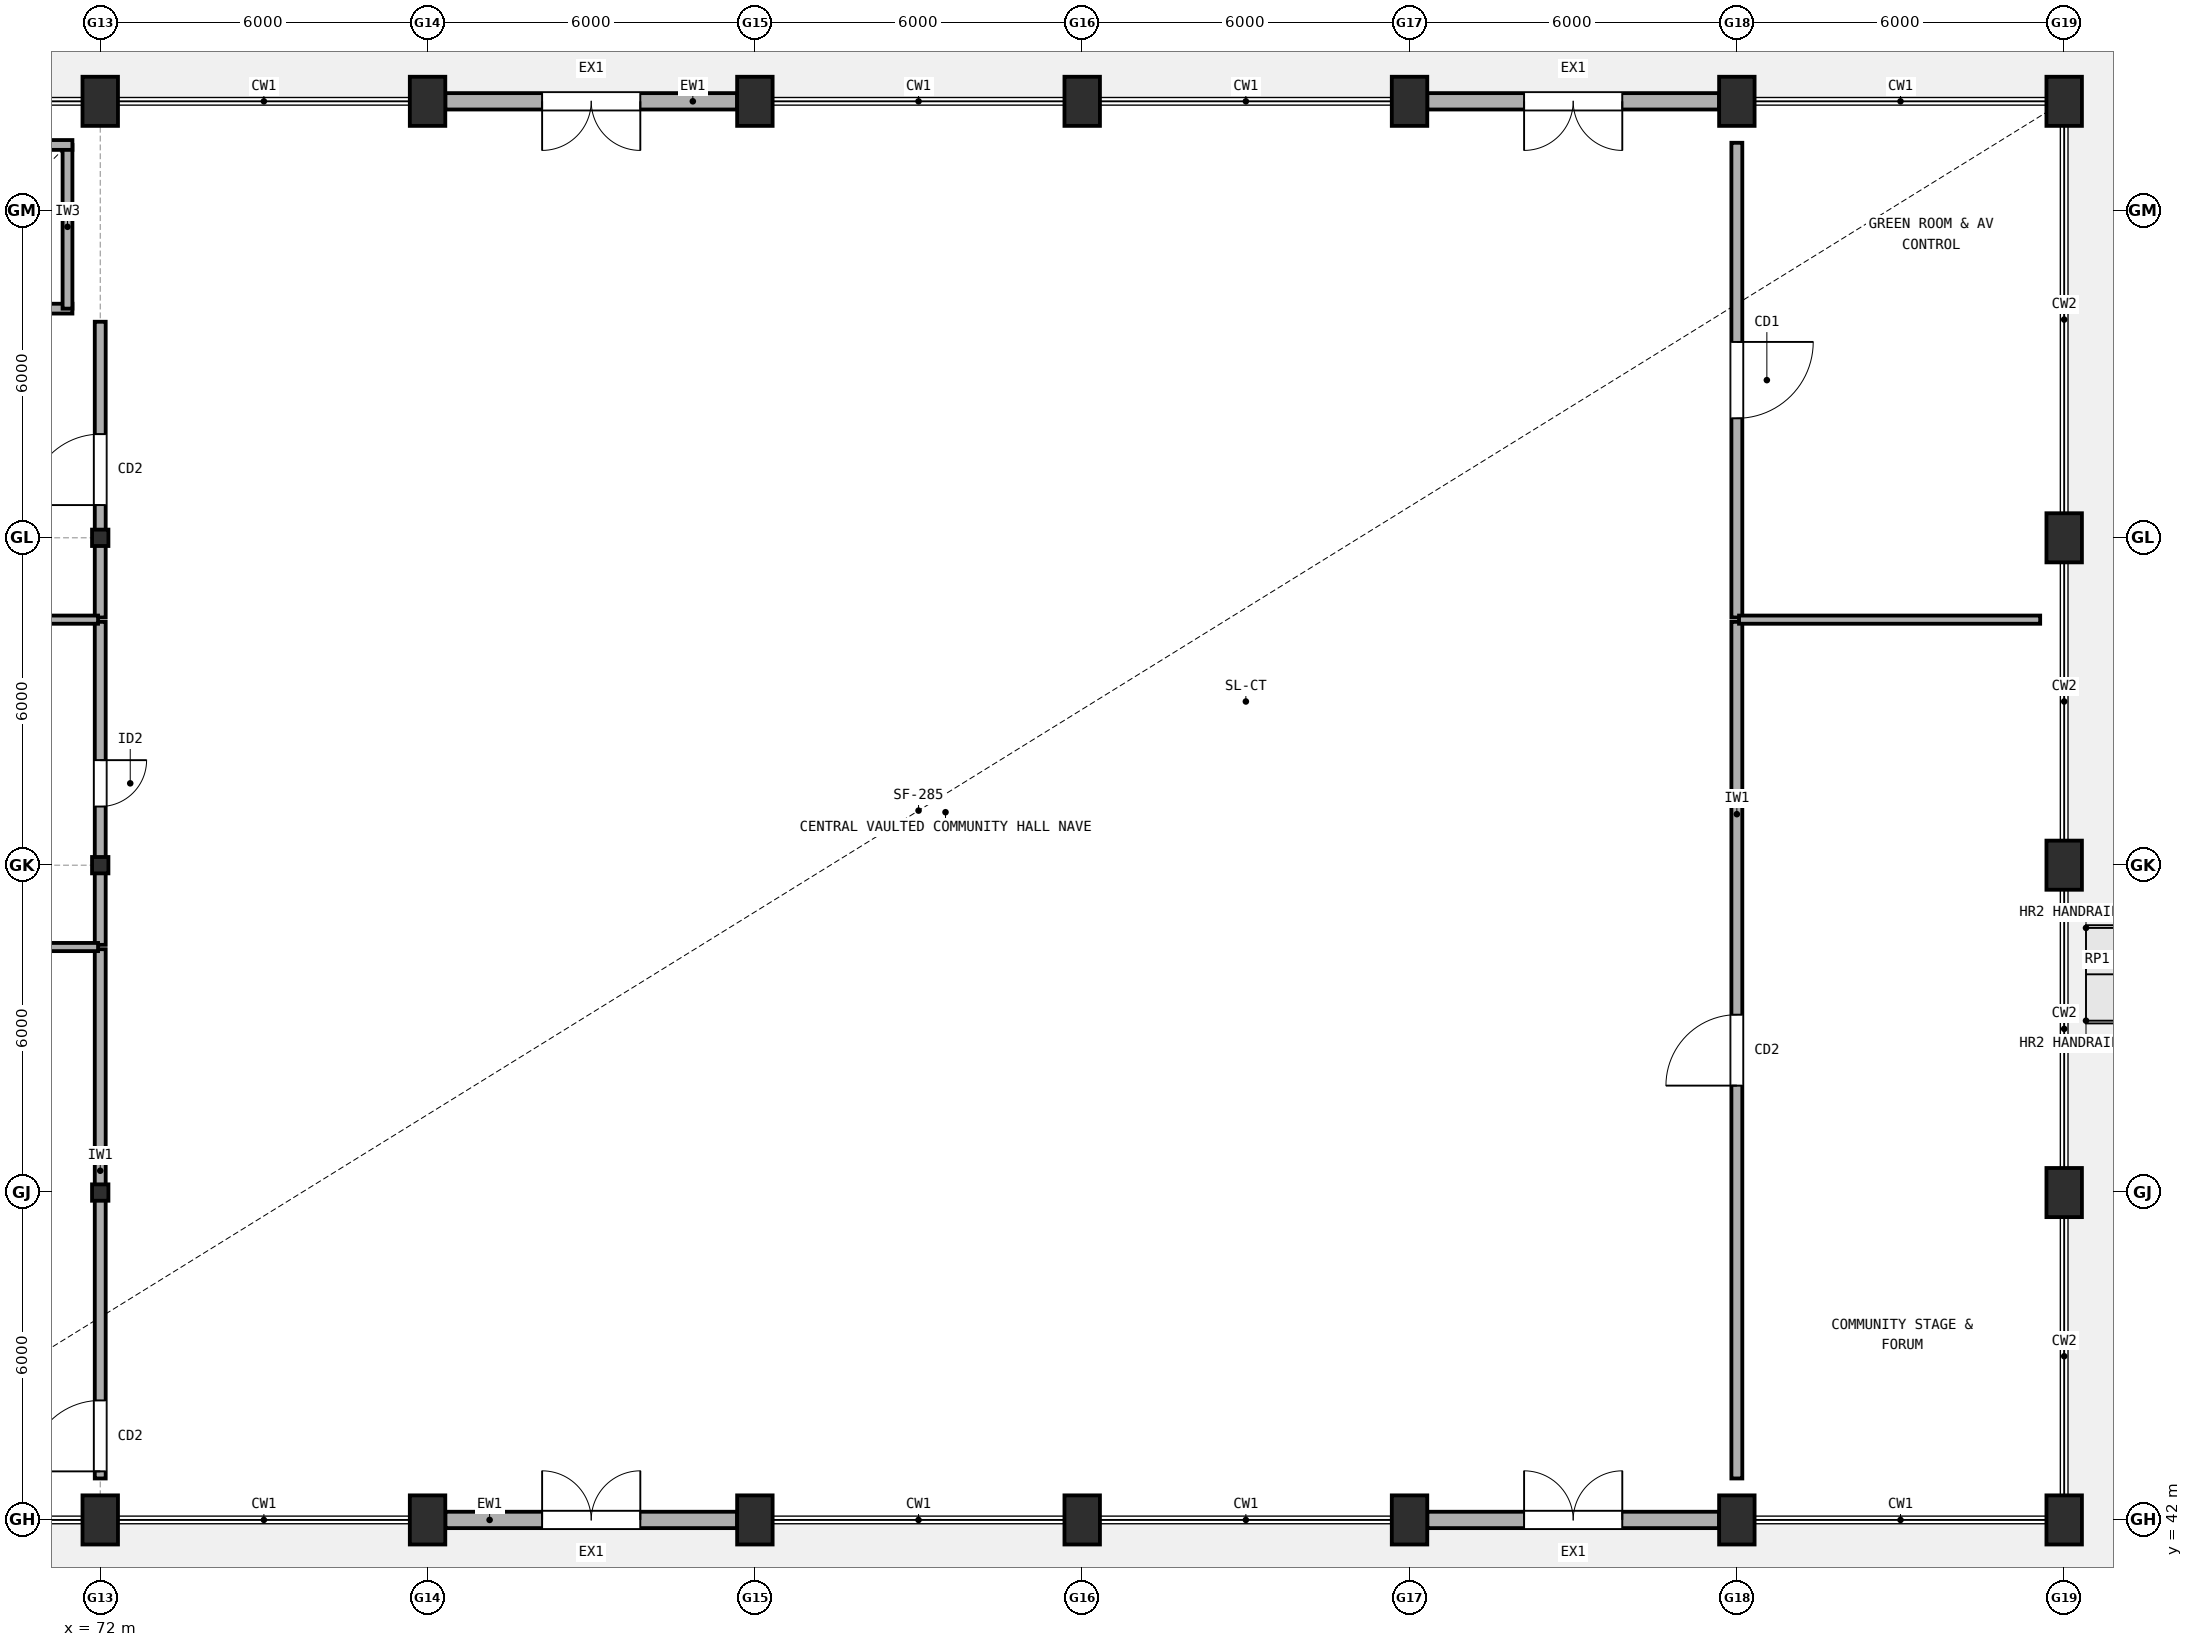
"""IFC4 building model, lengths in metres.
Left out: names, types, materials, properties, quantities, classifications, styles, units other than length and angle.
Written with IfcOpenShell. Run it as: python <this file> out.ifc"""

import sys

from ifc_helpers import new_model, si_unit, direction, frame, frame_2d, origin, origin_2d, place, context, subcontext, project, spatial, rectangle, i_section, extrude, element, fill, save


model = new_model("IFC4")
c1 = context("Model", 3, precision=1e-05, world=origin(), true_north=direction((0.0, 1.0)))
c2 = subcontext(c1, "Body", "Model", "MODEL_VIEW")
j1 = project(units=[si_unit("LENGTHUNIT", "METRE"), si_unit("PLANEANGLEUNIT", "RADIAN")], contexts=[c1])
p1 = place(None, origin())
s1 = spatial("IfcSite", under=j1, at=p1, CompositionType="ELEMENT")
p2 = place(p1, origin())
s2 = spatial("IfcBuilding", under=s1, at=p2, CompositionType="ELEMENT")
p3 = place(p2, origin())
s3 = spatial("IfcBuildingStorey", under=s2, at=p3, CompositionType="ELEMENT", Elevation=0.0)
p4 = place(p3, frame((72.0, 42.0, 0.0), z_axis=(0.0, 0.0, 1.0), x_axis=(1.0, 0.0, 0.0)))
e1 = element("IfcColumn", 1, at=p4, inside=s3, PredefinedType="COLUMN", context=c2, shape_type="SweptSolid", body=[
    extrude(rectangle(XDim=0.65, YDim=0.9, at=origin_2d()), origin(), (0.0, 0.0, 1.0), 4.23),
])
for number, where, z_axis, x_axis in (
    (2, (72.0, 48.0, 0.0), (0.0, 0.0, 1.0), (1.0, 0.0, 0.0)),
    (3, (72.0, 54.0, 0.0), (0.0, 0.0, 1.0), (1.0, 0.0, 0.0)),
    (4, (72.0, 60.0, 0.0), (0.0, 0.0, 1.0), (1.0, 0.0, 0.0)),
):
    element("IfcColumn", number, at=place(p3, frame(where, z_axis=z_axis, x_axis=x_axis)), inside=s3, PredefinedType="COLUMN", context=c2, shape_type="SweptSolid", body=[
        extrude(i_section(OverallWidth=0.3, OverallDepth=0.3, WebThickness=0.011, FlangeThickness=0.019, FilletRadius=0.027, at=origin_2d()), origin(), (0.0, 0.0, 1.0), 4.23),
    ])
p5 = place(p3, frame((72.0, 68.0, 0.0), z_axis=(0.0, 0.0, 1.0), x_axis=(1.0, 0.0, 0.0)))
e5 = element("IfcColumn", 5, at=p5, inside=s3, PredefinedType="COLUMN", context=c2, shape_type="SweptSolid", body=[
    extrude(rectangle(XDim=0.65, YDim=0.9, at=origin_2d()), origin(), (0.0, 0.0, 1.0), 4.23),
])
for number, where, z_axis, x_axis in (
    (6, (78.0, 42.0, 0.0), (0.0, 0.0, 1.0), (1.0, 0.0, 0.0)),
    (7, (78.0, 68.0, 0.0), (0.0, 0.0, 1.0), (1.0, 0.0, 0.0)),
    (8, (84.0, 42.0, 0.0), (0.0, 0.0, 1.0), (1.0, 0.0, 0.0)),
    (9, (84.0, 68.0, 0.0), (0.0, 0.0, 1.0), (1.0, 0.0, 0.0)),
    (10, (90.0, 42.0, 0.0), (0.0, 0.0, 1.0), (1.0, 0.0, 0.0)),
    (11, (90.0, 68.0, 0.0), (0.0, 0.0, 1.0), (1.0, 0.0, 0.0)),
    (12, (96.0, 42.0, 0.0), (0.0, 0.0, 1.0), (1.0, 0.0, 0.0)),
    (13, (96.0, 68.0, 0.0), (0.0, 0.0, 1.0), (1.0, 0.0, 0.0)),
    (14, (102.0, 42.0, 0.0), (0.0, 0.0, 1.0), (1.0, 0.0, 0.0)),
    (15, (102.0, 68.0, 0.0), (0.0, 0.0, 1.0), (1.0, 0.0, 0.0)),
    (16, (108.0, 42.0, 0.0), (0.0, 0.0, 1.0), (1.0, 0.0, 0.0)),
    (17, (108.0, 48.0, 0.0), (0.0, 0.0, 1.0), (1.0, 0.0, 0.0)),
    (18, (108.0, 54.0, 0.0), (0.0, 0.0, 1.0), (1.0, 0.0, 0.0)),
    (19, (108.0, 60.0, 0.0), (0.0, 0.0, 1.0), (1.0, 0.0, 0.0)),
    (20, (108.0, 68.0, 0.0), (0.0, 0.0, 1.0), (1.0, 0.0, 0.0)),
):
    element("IfcColumn", number, at=place(p3, frame(where, z_axis=z_axis, x_axis=x_axis)), inside=s3, PredefinedType="COLUMN", context=c2, shape_type="SweptSolid", body=[
        extrude(rectangle(XDim=0.65, YDim=0.9, at=origin_2d()), origin(), (0.0, 0.0, 1.0), 4.5),
    ])
p6 = place(p3, frame((78.325, 42.0, 0.0), z_axis=(0.0, 0.0, 1.0), x_axis=(1.0, 0.0, 0.0)))
e21 = element("IfcWall", 21, at=p6, inside=s3, PredefinedType="STANDARD", context=c2, shape_type="SweptSolid", body=[
    extrude(rectangle(XDim=5.35, YDim=0.3, at=frame_2d((2.675, 0.0))), origin(), (0.0, 0.0, 1.0), 3.112),
])
p7 = place(p6, frame((1.775, 0.0, 0.0)))
e22 = element("IfcOpeningElement", 22, at=p7, cuts=e21, PredefinedType="OPENING", context=c2, shape_type="SweptSolid", body=[
    extrude(rectangle(XDim=1.8, YDim=2.2, at=frame_2d((0.9, 1.1))), frame((0.0, 0.16, 0.0), z_axis=(0.0, -1.0, 0.0), x_axis=(1.0, 0.0, 0.0)), (0.0, 0.0, 1.0), 0.32),
])
p8 = place(p3, frame((83.675, 68.0, 0.0), z_axis=(0.0, 0.0, 1.0), x_axis=(-1.0, 0.0, 0.0)))
e23 = element("IfcWall", 23, at=p8, inside=s3, PredefinedType="STANDARD", context=c2, shape_type="SweptSolid", body=[
    extrude(rectangle(XDim=5.35, YDim=0.3, at=frame_2d((2.675, 0.0))), origin(), (0.0, 0.0, 1.0), 3.562),
])
p9 = place(p8, frame((1.775, 0.0, 0.0)))
e24 = element("IfcOpeningElement", 24, at=p9, cuts=e23, PredefinedType="OPENING", context=c2, shape_type="SweptSolid", body=[
    extrude(rectangle(XDim=1.8, YDim=2.2, at=frame_2d((0.9, 1.1))), frame((0.0, 0.16, 0.0), z_axis=(0.0, -1.0, 0.0), x_axis=(1.0, 0.0, 0.0)), (0.0, 0.0, 1.0), 0.32),
])
p10 = place(p3, frame((96.325, 42.0, 0.0), z_axis=(0.0, 0.0, 1.0), x_axis=(1.0, 0.0, 0.0)))
e25 = element("IfcWall", 25, at=p10, inside=s3, PredefinedType="STANDARD", context=c2, shape_type="SweptSolid", body=[
    extrude(rectangle(XDim=5.35, YDim=0.3, at=frame_2d((2.675, 0.0))), origin(), (0.0, 0.0, 1.0), 3.112),
])
p11 = place(p10, frame((1.775, 0.0, 0.0)))
e26 = element("IfcOpeningElement", 26, at=p11, cuts=e25, PredefinedType="OPENING", context=c2, shape_type="SweptSolid", body=[
    extrude(rectangle(XDim=1.8, YDim=2.2, at=frame_2d((0.9, 1.1))), frame((0.0, 0.16, 0.0), z_axis=(0.0, -1.0, 0.0), x_axis=(1.0, 0.0, 0.0)), (0.0, 0.0, 1.0), 0.32),
])
p12 = place(p3, frame((101.675, 68.0, 0.0), z_axis=(0.0, 0.0, 1.0), x_axis=(-1.0, 0.0, 0.0)))
e27 = element("IfcWall", 27, at=p12, inside=s3, PredefinedType="STANDARD", context=c2, shape_type="SweptSolid", body=[
    extrude(rectangle(XDim=5.35, YDim=0.3, at=frame_2d((2.675, 0.0))), origin(), (0.0, 0.0, 1.0), 3.562),
])
p13 = place(p12, frame((1.775, 0.0, 0.0)))
e28 = element("IfcOpeningElement", 28, at=p13, cuts=e27, PredefinedType="OPENING", context=c2, shape_type="SweptSolid", body=[
    extrude(rectangle(XDim=1.8, YDim=2.2, at=frame_2d((0.9, 1.1))), frame((0.0, 0.16, 0.0), z_axis=(0.0, -1.0, 0.0), x_axis=(1.0, 0.0, 0.0)), (0.0, 0.0, 1.0), 0.32),
])
p14 = place(p3, frame((68.31, 64.2, 0.0), z_axis=(0.0, 0.0, 1.0), x_axis=(1.0, 0.0, 0.0)))
e29 = element("IfcWall", 29, at=p14, inside=s3, PredefinedType="SOLIDWALL", context=c2, shape_type="SweptSolid", body=[
    extrude(rectangle(XDim=3.18, YDim=0.18, at=frame_2d((1.59, 0.0))), origin(), (0.0, 0.0, 1.0), 4.23),
])
p15 = place(p14, frame((1.115, 0.0, 0.0)))
e30 = element("IfcOpeningElement", 30, at=p15, cuts=e29, PredefinedType="OPENING", context=c2, shape_type="SweptSolid", body=[
    extrude(rectangle(XDim=0.95, YDim=2.15, at=frame_2d((0.475, 1.075))), frame((0.0, 0.1, 0.0), z_axis=(0.0, -1.0, 0.0), x_axis=(1.0, 0.0, 0.0)), (0.0, 0.0, 1.0), 0.2),
])
p16 = place(p3, frame((71.4, 64.2, 0.0), z_axis=(0.0, 0.0, 1.0), x_axis=(0.0, 1.0, 0.0)))
e31 = element("IfcWall", 31, at=p16, inside=s3, PredefinedType="SOLIDWALL", context=c2, shape_type="SweptSolid", body=[
    extrude(rectangle(XDim=3.0, YDim=0.18, at=frame_2d((1.5, 0.0))), origin(), (0.0, 0.0, 1.0), 4.23),
])
p17 = place(p3, frame((71.49, 67.2, 0.0), z_axis=(0.0, 0.0, 1.0), x_axis=(-1.0, 0.0, 0.0)))
e32 = element("IfcWall", 32, at=p17, inside=s3, PredefinedType="SOLIDWALL", context=c2, shape_type="SweptSolid", body=[
    extrude(rectangle(XDim=3.18, YDim=0.18, at=frame_2d((1.59, 0.0))), origin(), (0.0, 0.0, 1.0), 4.23),
])
p18 = place(p3, frame((72.0, 42.76, 0.0), z_axis=(0.0, 0.0, 1.0), x_axis=(0.0, 1.0, 0.0)))
e33 = element("IfcWall", 33, at=p18, inside=s3, PredefinedType="SOLIDWALL", context=c2, shape_type="SweptSolid", body=[
    extrude(rectangle(XDim=9.7, YDim=0.2, at=frame_2d((4.85, 0.0))), origin(), (0.0, 0.0, 1.0), 3.612),
])
p19 = place(p18, frame((0.13, 0.0, 0.0)))
e34 = element("IfcOpeningElement", 34, at=p19, cuts=e33, PredefinedType="OPENING", context=c2, shape_type="SweptSolid", body=[
    extrude(rectangle(XDim=1.3, YDim=2.15, at=frame_2d((0.65, 1.075))), frame((0.0, 0.11, 0.0), z_axis=(0.0, -1.0, 0.0), x_axis=(1.0, 0.0, 0.0)), (0.0, 0.0, 1.0), 0.22),
])
p20 = place(p3, frame((72.0, 52.54, 0.0), z_axis=(0.0, 0.0, 1.0), x_axis=(0.0, 1.0, 0.0)))
e35 = element("IfcWall", 35, at=p20, inside=s3, PredefinedType="SOLIDWALL", context=c2, shape_type="SweptSolid", body=[
    extrude(rectangle(XDim=5.92, YDim=0.2, at=frame_2d((2.96, 0.0))), origin(), (0.0, 0.0, 1.0), 3.612),
])
p21 = place(p20, frame((2.535, 0.0, 0.0)))
e36 = element("IfcOpeningElement", 36, at=p21, cuts=e35, PredefinedType="OPENING", context=c2, shape_type="SweptSolid", body=[
    extrude(rectangle(XDim=0.85, YDim=2.1, at=frame_2d((0.425, 1.05))), frame((0.0, 0.11, 0.0), z_axis=(0.0, -1.0, 0.0), x_axis=(1.0, 0.0, 0.0)), (0.0, 0.0, 1.0), 0.22),
])
p22 = place(p3, frame((72.0, 58.54, 0.0), z_axis=(0.0, 0.0, 1.0), x_axis=(0.0, 1.0, 0.0)))
e37 = element("IfcWall", 37, at=p22, inside=s3, PredefinedType="SOLIDWALL", context=c2, shape_type="SweptSolid", body=[
    extrude(rectangle(XDim=5.42, YDim=0.2, at=frame_2d((2.71, 0.0))), origin(), (0.0, 0.0, 1.0), 2.912),
])
p23 = place(p22, frame((2.06, 0.0, 0.0)))
e38 = element("IfcOpeningElement", 38, at=p23, cuts=e37, PredefinedType="OPENING", context=c2, shape_type="SweptSolid", body=[
    extrude(rectangle(XDim=1.3, YDim=2.15, at=frame_2d((0.65, 1.075))), frame((0.0, 0.11, 0.0), z_axis=(0.0, -1.0, 0.0), x_axis=(1.0, 0.0, 0.0)), (0.0, 0.0, 1.0), 0.22),
])
for number, where, z_axis, x_axis in (
    (39, (66.44, 52.5, 0.0), (0.0, 0.0, 1.0), (1.0, 0.0, 0.0)),
    (40, (66.44, 58.5, 0.0), (0.0, 0.0, 1.0), (1.0, 0.0, 0.0)),
):
    element("IfcWall", number, at=place(p3, frame(where, z_axis=z_axis, x_axis=x_axis)), inside=s3, PredefinedType="PARTITIONING", context=c2, shape_type="SweptSolid", body=[
        extrude(rectangle(XDim=5.52, YDim=0.15, at=frame_2d((2.76, 0.0))), origin(), (0.0, 0.0, 1.0), 3.612),
    ])
p24 = place(p3, frame((102.0, 42.76, 0.0), z_axis=(0.0, 0.0, 1.0), x_axis=(0.0, 1.0, 0.0)))
e41 = element("IfcWall", 41, at=p24, inside=s3, PredefinedType="SOLIDWALL", context=c2, shape_type="SweptSolid", body=[
    extrude(rectangle(XDim=15.7, YDim=0.2, at=frame_2d((7.85, 0.0))), origin(), (0.0, 0.0, 1.0), 4.23),
])
p25 = place(p24, frame((7.2, 0.0, 0.0)))
e42 = element("IfcOpeningElement", 42, at=p25, cuts=e41, PredefinedType="OPENING", context=c2, shape_type="SweptSolid", body=[
    extrude(rectangle(XDim=1.3, YDim=2.15, at=frame_2d((0.65, 1.075))), frame((0.0, 0.11, 0.0), z_axis=(0.0, -1.0, 0.0), x_axis=(1.0, 0.0, 0.0)), (0.0, 0.0, 1.0), 0.22),
])
p26 = place(p3, frame((102.0, 58.54, 0.0), z_axis=(0.0, 0.0, 1.0), x_axis=(0.0, 1.0, 0.0)))
e43 = element("IfcWall", 43, at=p26, inside=s3, PredefinedType="SOLIDWALL", context=c2, shape_type="SweptSolid", body=[
    extrude(rectangle(XDim=8.7, YDim=0.2, at=frame_2d((4.35, 0.0))), origin(), (0.0, 0.0, 1.0), 4.23),
])
p27 = place(p26, frame((3.65, 0.0, 0.0)))
e44 = element("IfcOpeningElement", 44, at=p27, cuts=e43, PredefinedType="OPENING", context=c2, shape_type="SweptSolid", body=[
    extrude(rectangle(XDim=1.4, YDim=2.15, at=frame_2d((0.7, 1.075))), frame((0.0, 0.11, 0.0), z_axis=(0.0, -1.0, 0.0), x_axis=(1.0, 0.0, 0.0)), (0.0, 0.0, 1.0), 0.22),
])
p28 = place(p3, frame((102.04, 58.5, 0.0), z_axis=(0.0, 0.0, 1.0), x_axis=(1.0, 0.0, 0.0)))
e45 = element("IfcWall", 45, at=p28, inside=s3, PredefinedType="PARTITIONING", context=c2, shape_type="SweptSolid", body=[
    extrude(rectangle(XDim=5.52, YDim=0.15, at=frame_2d((2.76, 0.0))), origin(), (0.0, 0.0, 1.0), 4.23),
])
p29 = place(p7, frame((1.8, 0.0, 0.0), z_axis=(0.0, 0.0, 1.0), x_axis=(-1.0, 0.0, 0.0)))
e46 = element("IfcDoor", 46, at=p29, inside=s3, OperationType="DOUBLE_DOOR_SINGLE_SWING", PredefinedType="DOOR", context=c2, shape_type="SweptSolid", body=[
    extrude(rectangle(XDim=1.8, YDim=2.2, at=frame_2d((0.9, 1.1))), frame((0.0, 0.025, 0.0), z_axis=(0.0, -1.0, 0.0), x_axis=(1.0, 0.0, 0.0)), (0.0, 0.0, 1.0), 0.05),
])
fill(e22, e46)
p30 = place(p9, frame((1.8, 0.0, 0.0), z_axis=(0.0, 0.0, 1.0), x_axis=(-1.0, 0.0, 0.0)))
e47 = element("IfcDoor", 47, at=p30, inside=s3, OperationType="DOUBLE_DOOR_SINGLE_SWING", PredefinedType="DOOR", context=c2, shape_type="SweptSolid", body=[
    extrude(rectangle(XDim=1.8, YDim=2.2, at=frame_2d((0.9, 1.1))), frame((0.0, 0.025, 0.0), z_axis=(0.0, -1.0, 0.0), x_axis=(1.0, 0.0, 0.0)), (0.0, 0.0, 1.0), 0.05),
])
fill(e24, e47)
p31 = place(p11, frame((1.8, 0.0, 0.0), z_axis=(0.0, 0.0, 1.0), x_axis=(-1.0, 0.0, 0.0)))
e48 = element("IfcDoor", 48, at=p31, inside=s3, OperationType="DOUBLE_DOOR_SINGLE_SWING", PredefinedType="DOOR", context=c2, shape_type="SweptSolid", body=[
    extrude(rectangle(XDim=1.8, YDim=2.2, at=frame_2d((0.9, 1.1))), frame((0.0, 0.025, 0.0), z_axis=(0.0, -1.0, 0.0), x_axis=(1.0, 0.0, 0.0)), (0.0, 0.0, 1.0), 0.05),
])
fill(e26, e48)
p32 = place(p13, frame((1.8, 0.0, 0.0), z_axis=(0.0, 0.0, 1.0), x_axis=(-1.0, 0.0, 0.0)))
e49 = element("IfcDoor", 49, at=p32, inside=s3, OperationType="DOUBLE_DOOR_SINGLE_SWING", PredefinedType="DOOR", context=c2, shape_type="SweptSolid", body=[
    extrude(rectangle(XDim=1.8, YDim=2.2, at=frame_2d((0.9, 1.1))), frame((0.0, 0.025, 0.0), z_axis=(0.0, -1.0, 0.0), x_axis=(1.0, 0.0, 0.0)), (0.0, 0.0, 1.0), 0.05),
])
fill(e28, e49)
p33 = place(p19, origin())
e50 = element("IfcDoor", 50, at=p33, inside=s3, OperationType="SINGLE_SWING_LEFT", PredefinedType="DOOR", context=c2, shape_type="SweptSolid", body=[
    extrude(rectangle(XDim=1.3, YDim=2.15, at=frame_2d((0.65, 1.075))), frame((0.0, 0.025, 0.0), z_axis=(0.0, -1.0, 0.0), x_axis=(1.0, 0.0, 0.0)), (0.0, 0.0, 1.0), 0.05),
])
fill(e34, e50)
p34 = place(p21, origin())
e51 = element("IfcDoor", 51, at=p34, inside=s3, OperationType="SINGLE_SWING_RIGHT", PredefinedType="DOOR", context=c2, shape_type="SweptSolid", body=[
    extrude(rectangle(XDim=0.85, YDim=2.1, at=frame_2d((0.425, 1.05))), frame((0.0, 0.025, 0.0), z_axis=(0.0, -1.0, 0.0), x_axis=(1.0, 0.0, 0.0)), (0.0, 0.0, 1.0), 0.05),
])
fill(e36, e51)
p35 = place(p23, origin())
e52 = element("IfcDoor", 52, at=p35, inside=s3, OperationType="SINGLE_SWING_LEFT", PredefinedType="DOOR", context=c2, shape_type="SweptSolid", body=[
    extrude(rectangle(XDim=1.3, YDim=2.15, at=frame_2d((0.65, 1.075))), frame((0.0, 0.025, 0.0), z_axis=(0.0, -1.0, 0.0), x_axis=(1.0, 0.0, 0.0)), (0.0, 0.0, 1.0), 0.05),
])
fill(e38, e52)
p36 = place(p25, origin())
e53 = element("IfcDoor", 53, at=p36, inside=s3, OperationType="SINGLE_SWING_LEFT", PredefinedType="DOOR", context=c2, shape_type="SweptSolid", body=[
    extrude(rectangle(XDim=1.3, YDim=2.15, at=frame_2d((0.65, 1.075))), frame((0.0, 0.025, 0.0), z_axis=(0.0, -1.0, 0.0), x_axis=(1.0, 0.0, 0.0)), (0.0, 0.0, 1.0), 0.05),
])
fill(e42, e53)
p37 = place(p27, origin())
e54 = element("IfcDoor", 54, at=p37, inside=s3, OperationType="SINGLE_SWING_RIGHT", PredefinedType="DOOR", context=c2, shape_type="SweptSolid", body=[
    extrude(rectangle(XDim=1.4, YDim=2.15, at=frame_2d((0.7, 1.075))), frame((0.0, 0.025, 0.0), z_axis=(0.0, -1.0, 0.0), x_axis=(1.0, 0.0, 0.0)), (0.0, 0.0, 1.0), 0.05),
])
fill(e44, e54)
save(model, sys.argv[1])
